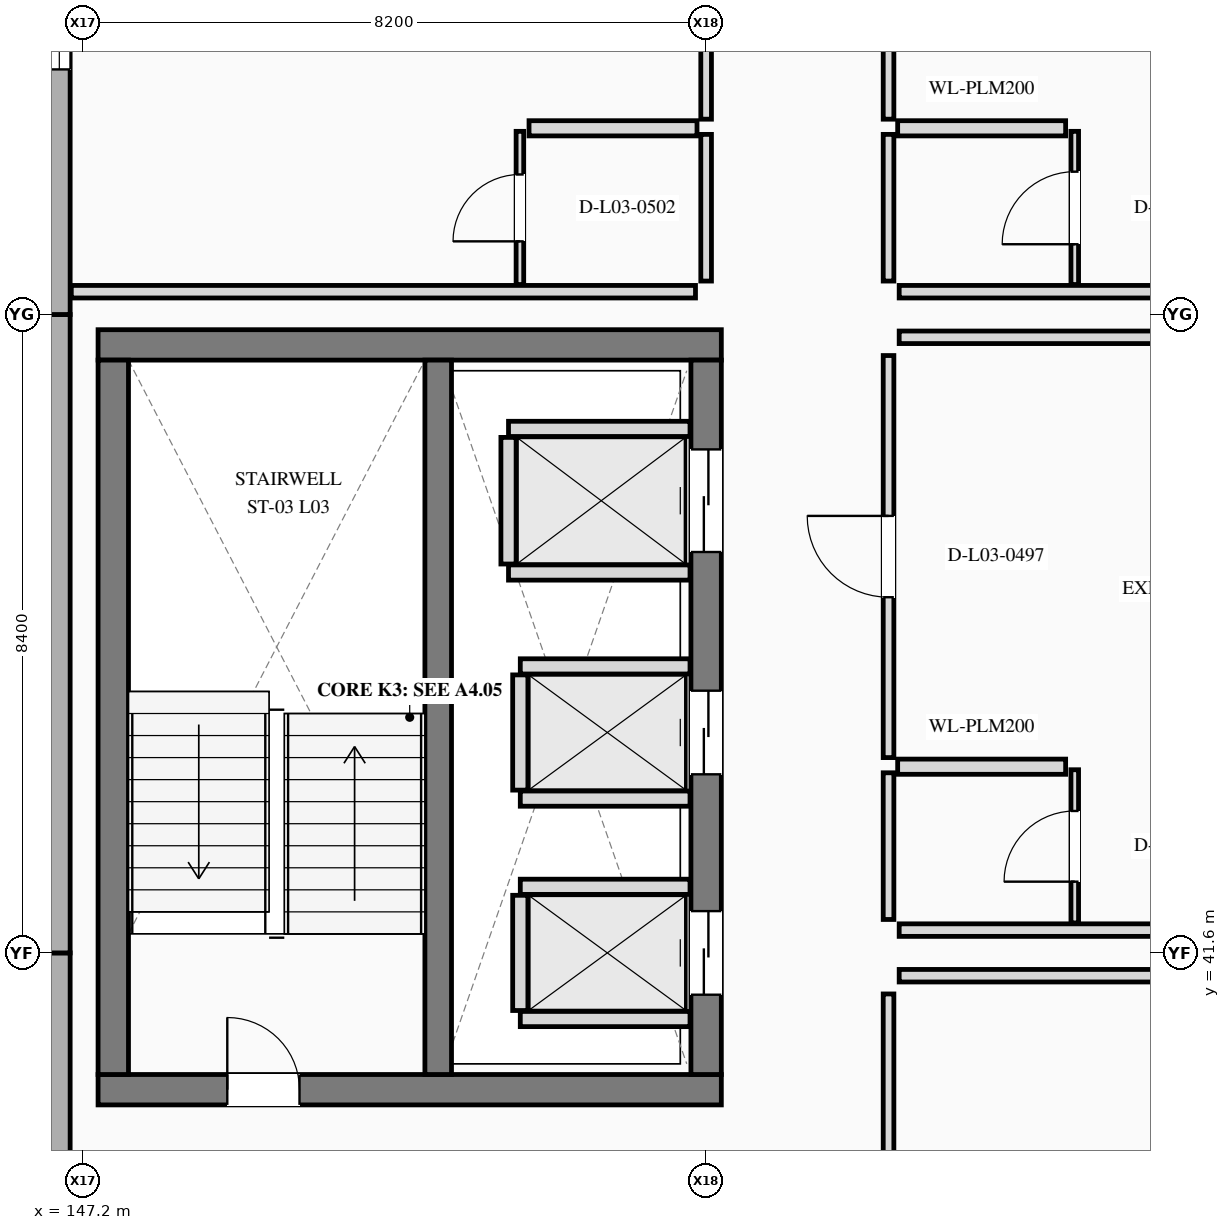
"""IFC4 building model, lengths in metres.
Left out: names, types, materials, properties, quantities, classifications, styles, units other than length and angle.
Written with IfcOpenShell. Run it as: python <this file> out.ifc"""

import sys

from ifc_helpers import new_model, si_unit, direction, frame, frame_2d, origin, place, context, subcontext, project, spatial, rectangle, extrude, element, fill, save


model = new_model("IFC4")
c1 = context("Model", 3, precision=1e-05, world=origin(), true_north=direction((0.0, 1.0)))
c2 = subcontext(c1, "Body", "Model", "MODEL_VIEW")
j1 = project(units=[si_unit("LENGTHUNIT", "METRE"), si_unit("PLANEANGLEUNIT", "RADIAN")], contexts=[c1])
p1 = place(None, origin())
s1 = spatial("IfcSite", under=j1, at=p1, CompositionType="ELEMENT")
p2 = place(p1, origin())
s2 = spatial("IfcBuilding", under=s1, at=p2, CompositionType="ELEMENT")
p3 = place(p2, frame((0.0, 0.0, 15.6)))
s3 = spatial("IfcBuildingStorey", under=s2, at=p3, CompositionType="ELEMENT", Elevation=15.6)
p4 = place(p3, frame((146.89, 33.2, 0.0), z_axis=(0.0, 0.0, 1.0), x_axis=(0.0, 1.0, 0.0)))
e1 = element("IfcWall", 1, at=p4, inside=s3, PredefinedType="STANDARD", context=c2, shape_type="SweptSolid", body=[
    extrude(rectangle(XDim=8.4, YDim=0.285, at=frame_2d((4.2, 0.0))), origin(), (0.0, 0.0, 1.0), 3.9),
])
p5 = place(p3, frame((146.89, 41.6, 0.0), z_axis=(0.0, 0.0, 1.0), x_axis=(0.0, 1.0, 0.0)))
e2 = element("IfcWall", 2, at=p5, inside=s3, PredefinedType="STANDARD", context=c2, shape_type="SweptSolid", body=[
    extrude(rectangle(XDim=8.4, YDim=0.285, at=frame_2d((4.2, 0.0))), origin(), (0.0, 0.0, 1.0), 3.9),
])
p6 = place(p3, frame((146.89, 50.0, 0.0), z_axis=(0.0, 0.0, 1.0), x_axis=(0.0, 1.0, 0.0)))
e3 = element("IfcWall", 3, at=p6, inside=s3, PredefinedType="STANDARD", context=c2, shape_type="SweptSolid", body=[
    extrude(rectangle(XDim=8.4, YDim=0.285, at=frame_2d((4.2, 0.0))), origin(), (0.0, 0.0, 1.0), 3.9),
])
p7 = place(p6, frame((3.225, 0.0, 0.85)))
e4 = element("IfcOpeningElement", 4, at=p7, cuts=e3, PredefinedType="OPENING", context=c2, shape_type="SweptSolid", body=[
    extrude(rectangle(XDim=1.95, YDim=1.85, at=frame_2d((0.975, 0.925))), frame((0.0, 0.152, 0.0), z_axis=(0.0, -1.0, 0.0), x_axis=(1.0, 0.0, 0.0)), (0.0, 0.0, 1.0), 0.305),
])
p8 = place(p3, frame((147.4, 39.8, 0.0), z_axis=(0.0, 0.0, 1.0), x_axis=(1.0, 0.0, 0.0)))
e5 = element("IfcWall", 5, at=p8, inside=s3, PredefinedType="SHEAR", context=c2, shape_type="SweptSolid", body=[
    extrude(rectangle(XDim=8.2, YDim=0.4, at=frame_2d((4.1, 0.0))), origin(), (0.0, 0.0, 1.0), 3.9),
])
p9 = place(p8, frame((1.7, 0.0, 0.0)))
e6 = element("IfcOpeningElement", 6, at=p9, cuts=e5, PredefinedType="OPENING", context=c2, shape_type="SweptSolid", body=[
    extrude(rectangle(XDim=0.95, YDim=2.2, at=frame_2d((0.475, 1.1))), frame((0.0, 0.21, 0.0), z_axis=(0.0, -1.0, 0.0), x_axis=(1.0, 0.0, 0.0)), (0.0, 0.0, 1.0), 0.42),
])
p10 = place(p3, frame((155.6, 49.6, 0.0), z_axis=(0.0, 0.0, 1.0), x_axis=(-1.0, 0.0, 0.0)))
e7 = element("IfcWall", 7, at=p10, inside=s3, PredefinedType="SHEAR", context=c2, shape_type="SweptSolid", body=[
    extrude(rectangle(XDim=8.2, YDim=0.4, at=frame_2d((4.1, 0.0))), origin(), (0.0, 0.0, 1.0), 3.9),
])
p11 = place(p3, frame((147.6, 49.4, 0.0), z_axis=(0.0, 0.0, 1.0), x_axis=(0.0, -1.0, 0.0)))
e8 = element("IfcWall", 8, at=p11, inside=s3, PredefinedType="SHEAR", context=c2, shape_type="SweptSolid", body=[
    extrude(rectangle(XDim=9.4, YDim=0.4, at=frame_2d((4.7, 0.0))), origin(), (0.0, 0.0, 1.0), 3.9),
])
p12 = place(p3, frame((155.4, 40.0, 0.0), z_axis=(0.0, 0.0, 1.0), x_axis=(0.0, 1.0, 0.0)))
e9 = element("IfcWall", 9, at=p12, inside=s3, PredefinedType="SHEAR", context=c2, shape_type="SweptSolid", body=[
    extrude(rectangle(XDim=9.4, YDim=0.4, at=frame_2d((4.7, 0.0))), origin(), (0.0, 0.0, 1.0), 3.9),
])
p13 = place(p12, frame((1.05, 0.0, 0.0)))
e10 = element("IfcOpeningElement", 10, at=p13, cuts=e9, PredefinedType="OPENING", context=c2, shape_type="SweptSolid", body=[
    extrude(rectangle(XDim=1.1, YDim=2.2, at=frame_2d((0.55, 1.1))), frame((0.0, 0.21, 0.0), z_axis=(0.0, -1.0, 0.0), x_axis=(1.0, 0.0, 0.0)), (0.0, 0.0, 1.0), 0.42),
])
p14 = place(p12, frame((3.95, 0.0, 0.0)))
e11 = element("IfcOpeningElement", 11, at=p14, cuts=e9, PredefinedType="OPENING", context=c2, shape_type="SweptSolid", body=[
    extrude(rectangle(XDim=1.1, YDim=2.2, at=frame_2d((0.55, 1.1))), frame((0.0, 0.21, 0.0), z_axis=(0.0, -1.0, 0.0), x_axis=(1.0, 0.0, 0.0)), (0.0, 0.0, 1.0), 0.42),
])
p15 = place(p12, frame((6.875, 0.0, 0.0)))
e12 = element("IfcOpeningElement", 12, at=p15, cuts=e9, PredefinedType="OPENING", context=c2, shape_type="SweptSolid", body=[
    extrude(rectangle(XDim=1.35, YDim=2.3, at=frame_2d((0.675, 1.15))), frame((0.0, 0.21, 0.0), z_axis=(0.0, -1.0, 0.0), x_axis=(1.0, 0.0, 0.0)), (0.0, 0.0, 1.0), 0.42),
])
p16 = place(p3, frame((151.875, 40.0, 0.0), z_axis=(0.0, 0.0, 1.0), x_axis=(0.0, 1.0, 0.0)))
e13 = element("IfcWall", 13, at=p16, inside=s3, PredefinedType="SHEAR", context=c2, shape_type="SweptSolid", body=[
    extrude(rectangle(XDim=9.4, YDim=0.35, at=frame_2d((4.7, 0.0))), origin(), (0.0, 0.0, 1.0), 3.9),
])
for number, where, z_axis, x_axis in (
    (14, (152.955, 40.73, 0.0), (0.0, 0.0, 1.0), (1.0, 0.0, 0.0)),
    (15, (152.955, 42.47, 0.0), (0.0, 0.0, 1.0), (1.0, 0.0, 0.0)),
):
    element("IfcWall", number, at=place(p3, frame(where, z_axis=z_axis, x_axis=x_axis)), inside=s3, PredefinedType="PLUMBINGWALL", context=c2, shape_type="SweptSolid", body=[
        extrude(rectangle(XDim=2.233, YDim=0.2, at=frame_2d((1.116, 0.0))), origin(), (0.0, 0.0, 1.0), 3.6),
    ])
p17 = place(p3, frame((152.955, 40.842, 0.0), z_axis=(0.0, 0.0, 1.0), x_axis=(0.0, 1.0, 0.0)))
e16 = element("IfcWall", 16, at=p17, inside=s3, PredefinedType="PLUMBINGWALL", context=c2, shape_type="SweptSolid", body=[
    extrude(rectangle(XDim=1.516, YDim=0.2, at=frame_2d((0.758, 0.0))), origin(), (0.0, 0.0, 1.0), 3.6),
])
for number, where, z_axis, x_axis in (
    (17, (152.955, 43.63, 0.0), (0.0, 0.0, 1.0), (1.0, 0.0, 0.0)),
    (18, (152.955, 45.37, 0.0), (0.0, 0.0, 1.0), (1.0, 0.0, 0.0)),
):
    element("IfcWall", number, at=place(p3, frame(where, z_axis=z_axis, x_axis=x_axis)), inside=s3, PredefinedType="PLUMBINGWALL", context=c2, shape_type="SweptSolid", body=[
        extrude(rectangle(XDim=2.233, YDim=0.2, at=frame_2d((1.116, 0.0))), origin(), (0.0, 0.0, 1.0), 3.6),
    ])
p18 = place(p3, frame((152.955, 43.742, 0.0), z_axis=(0.0, 0.0, 1.0), x_axis=(0.0, 1.0, 0.0)))
e19 = element("IfcWall", 19, at=p18, inside=s3, PredefinedType="PLUMBINGWALL", context=c2, shape_type="SweptSolid", body=[
    extrude(rectangle(XDim=1.516, YDim=0.2, at=frame_2d((0.758, 0.0))), origin(), (0.0, 0.0, 1.0), 3.6),
])
for number, where, z_axis, x_axis in (
    (20, (152.8, 46.605, 0.0), (0.0, 0.0, 1.0), (1.0, 0.0, 0.0)),
    (21, (152.8, 48.495, 0.0), (0.0, 0.0, 1.0), (1.0, 0.0, 0.0)),
):
    element("IfcWall", number, at=place(p3, frame(where, z_axis=z_axis, x_axis=x_axis)), inside=s3, PredefinedType="PLUMBINGWALL", context=c2, shape_type="SweptSolid", body=[
        extrude(rectangle(XDim=2.388, YDim=0.2, at=frame_2d((1.194, 0.0))), origin(), (0.0, 0.0, 1.0), 3.6),
    ])
p19 = place(p3, frame((152.8, 46.717, 0.0), z_axis=(0.0, 0.0, 1.0), x_axis=(0.0, 1.0, 0.0)))
e22 = element("IfcWall", 22, at=p19, inside=s3, PredefinedType="PLUMBINGWALL", context=c2, shape_type="SweptSolid", body=[
    extrude(rectangle(XDim=1.666, YDim=0.2, at=frame_2d((0.833, 0.0))), origin(), (0.0, 0.0, 1.0), 3.6),
])
p20 = place(p3, frame((157.8, 35.77, 0.0), z_axis=(0.0, 0.0, 1.0), x_axis=(0.0, 1.0, 0.0)))
e23 = element("IfcWall", 23, at=p20, inside=s3, PredefinedType="PARTITIONING", context=c2, shape_type="SweptSolid", body=[
    extrude(rectangle(XDim=5.29, YDim=0.14, at=frame_2d((2.645, 0.0))), origin(), (0.0, 0.0, 1.0), 3.153),
])
p21 = place(p20, frame((2.14, 0.0, 0.0)))
e24 = element("IfcOpeningElement", 24, at=p21, cuts=e23, PredefinedType="OPENING", context=c2, shape_type="SweptSolid", body=[
    extrude(rectangle(XDim=1.01, YDim=2.2, at=frame_2d((0.505, 1.1))), frame((0.0, 0.08, 0.0), z_axis=(0.0, -1.0, 0.0), x_axis=(1.0, 0.0, 0.0)), (0.0, 0.0, 1.0), 0.16),
])
p22 = place(p3, frame((157.94, 41.3, 0.0), z_axis=(0.0, 0.0, 1.0), x_axis=(1.0, 0.0, 0.0)))
e25 = element("IfcWall", 25, at=p22, inside=s3, PredefinedType="PARTITIONING", context=c2, shape_type="SweptSolid", body=[
    extrude(rectangle(XDim=8.213, YDim=0.165, at=frame_2d((4.106, 0.0))), origin(), (0.0, 0.0, 1.0), 2.99),
])
p23 = place(p3, frame((157.8, 42.04, 0.0), z_axis=(0.0, 0.0, 1.0), x_axis=(0.0, 1.0, 0.0)))
e26 = element("IfcWall", 26, at=p23, inside=s3, PredefinedType="PARTITIONING", context=c2, shape_type="SweptSolid", body=[
    extrude(rectangle(XDim=1.93, YDim=0.14, at=frame_2d((0.965, 0.0))), origin(), (0.0, 0.0, 1.0), 3.6),
])
p24 = place(p3, frame((157.8, 44.17, 0.0), z_axis=(0.0, 0.0, 1.0), x_axis=(0.0, 1.0, 0.0)))
e27 = element("IfcWall", 27, at=p24, inside=s3, PredefinedType="PARTITIONING", context=c2, shape_type="SweptSolid", body=[
    extrude(rectangle(XDim=5.29, YDim=0.14, at=frame_2d((2.645, 0.0))), origin(), (0.0, 0.0, 1.0), 3.6),
])
p25 = place(p24, frame((2.11, 0.0, 0.0)))
e28 = element("IfcOpeningElement", 28, at=p25, cuts=e27, PredefinedType="OPENING", context=c2, shape_type="SweptSolid", body=[
    extrude(rectangle(XDim=1.07, YDim=2.25, at=frame_2d((0.535, 1.125))), frame((0.0, 0.08, 0.0), z_axis=(0.0, -1.0, 0.0), x_axis=(1.0, 0.0, 0.0)), (0.0, 0.0, 1.0), 0.16),
])
for number, where, z_axis, x_axis in (
    (29, (157.94, 41.9, 0.0), (0.0, 0.0, 1.0), (1.0, 0.0, 0.0)),
    (30, (157.94, 49.7, 0.0), (0.0, 0.0, 1.0), (1.0, 0.0, 0.0)),
):
    element("IfcWall", number, at=place(p3, frame(where, z_axis=z_axis, x_axis=x_axis)), inside=s3, PredefinedType="PARTITIONING", context=c2, shape_type="SweptSolid", body=[
        extrude(rectangle(XDim=8.213, YDim=0.165, at=frame_2d((4.106, 0.0))), origin(), (0.0, 0.0, 1.0), 2.99),
    ])
p26 = place(p3, frame((157.92, 44.05, 0.0), z_axis=(0.0, 0.0, 1.0), x_axis=(1.0, 0.0, 0.0)))
e31 = element("IfcWall", 31, at=p26, inside=s3, PredefinedType="PLUMBINGWALL", context=c2, shape_type="SweptSolid", body=[
    extrude(rectangle(XDim=2.21, YDim=0.2, at=frame_2d((1.105, 0.0))), origin(), (0.0, 0.0, 1.0), 3.6),
])
p27 = place(p3, frame((160.25, 41.994, 0.0), z_axis=(0.0, 0.0, 1.0), x_axis=(0.0, 1.0, 0.0)))
e32 = element("IfcWall", 32, at=p27, inside=s3, PredefinedType="PARTITIONING", context=c2, shape_type="SweptSolid", body=[
    extrude(rectangle(XDim=2.016, YDim=0.1, at=frame_2d((1.008, 0.0))), origin(), (0.0, 0.0, 1.0), 3.6),
])
p28 = place(p27, frame((0.543, 0.0, 0.0)))
e33 = element("IfcOpeningElement", 33, at=p28, cuts=e32, PredefinedType="OPENING", context=c2, shape_type="SweptSolid", body=[
    extrude(rectangle(XDim=0.93, YDim=2.22, at=frame_2d((0.465, 1.11))), frame((0.0, 0.06, 0.0), z_axis=(0.0, -1.0, 0.0), x_axis=(1.0, 0.0, 0.0)), (0.0, 0.0, 1.0), 0.12),
])
p29 = place(p3, frame((157.8, 50.44, 0.0), z_axis=(0.0, 0.0, 1.0), x_axis=(0.0, 1.0, 0.0)))
e34 = element("IfcWall", 34, at=p29, inside=s3, PredefinedType="PARTITIONING", context=c2, shape_type="SweptSolid", body=[
    extrude(rectangle(XDim=1.93, YDim=0.14, at=frame_2d((0.965, 0.0))), origin(), (0.0, 0.0, 1.0), 3.153),
])
p30 = place(p3, frame((157.8, 52.57, 0.0), z_axis=(0.0, 0.0, 1.0), x_axis=(0.0, 1.0, 0.0)))
e35 = element("IfcWall", 35, at=p30, inside=s3, PredefinedType="PARTITIONING", context=c2, shape_type="SweptSolid", body=[
    extrude(rectangle(XDim=5.29, YDim=0.14, at=frame_2d((2.645, 0.0))), origin(), (0.0, 0.0, 1.0), 3.153),
])
p31 = place(p30, frame((2.185, 0.0, 0.0)))
e36 = element("IfcOpeningElement", 36, at=p31, cuts=e35, PredefinedType="OPENING", context=c2, shape_type="SweptSolid", body=[
    extrude(rectangle(XDim=0.92, YDim=2.3, at=frame_2d((0.46, 1.15))), frame((0.0, 0.08, 0.0), z_axis=(0.0, -1.0, 0.0), x_axis=(1.0, 0.0, 0.0)), (0.0, 0.0, 1.0), 0.16),
])
p32 = place(p3, frame((157.94, 50.3, 0.0), z_axis=(0.0, 0.0, 1.0), x_axis=(1.0, 0.0, 0.0)))
e37 = element("IfcWall", 37, at=p32, inside=s3, PredefinedType="PARTITIONING", context=c2, shape_type="SweptSolid", body=[
    extrude(rectangle(XDim=8.213, YDim=0.165, at=frame_2d((4.106, 0.0))), origin(), (0.0, 0.0, 1.0), 2.99),
])
p33 = place(p3, frame((157.92, 52.45, 0.0), z_axis=(0.0, 0.0, 1.0), x_axis=(1.0, 0.0, 0.0)))
e38 = element("IfcWall", 38, at=p33, inside=s3, PredefinedType="PLUMBINGWALL", context=c2, shape_type="SweptSolid", body=[
    extrude(rectangle(XDim=2.21, YDim=0.2, at=frame_2d((1.105, 0.0))), origin(), (0.0, 0.0, 1.0), 3.6),
])
p34 = place(p3, frame((160.25, 50.395, 0.0), z_axis=(0.0, 0.0, 1.0), x_axis=(0.0, 1.0, 0.0)))
e39 = element("IfcWall", 39, at=p34, inside=s3, PredefinedType="PARTITIONING", context=c2, shape_type="SweptSolid", body=[
    extrude(rectangle(XDim=2.015, YDim=0.1, at=frame_2d((1.008, 0.0))), origin(), (0.0, 0.0, 1.0), 3.153),
])
p35 = place(p34, frame((0.53, 0.0, 0.0)))
e40 = element("IfcOpeningElement", 40, at=p35, cuts=e39, PredefinedType="OPENING", context=c2, shape_type="SweptSolid", body=[
    extrude(rectangle(XDim=0.955, YDim=2.22, at=frame_2d((0.478, 1.11))), frame((0.0, 0.06, 0.0), z_axis=(0.0, -1.0, 0.0), x_axis=(1.0, 0.0, 0.0)), (0.0, 0.0, 1.0), 0.12),
])
p36 = place(p3, frame((155.4, 50.44, 0.0), z_axis=(0.0, 0.0, 1.0), x_axis=(0.0, 1.0, 0.0)))
e41 = element("IfcWall", 41, at=p36, inside=s3, PredefinedType="PARTITIONING", context=c2, shape_type="SweptSolid", body=[
    extrude(rectangle(XDim=1.93, YDim=0.14, at=frame_2d((0.965, 0.0))), origin(), (0.0, 0.0, 1.0), 2.99),
])
p37 = place(p3, frame((155.4, 52.57, 0.0), z_axis=(0.0, 0.0, 1.0), x_axis=(0.0, 1.0, 0.0)))
e42 = element("IfcWall", 42, at=p37, inside=s3, PredefinedType="PARTITIONING", context=c2, shape_type="SweptSolid", body=[
    extrude(rectangle(XDim=5.29, YDim=0.14, at=frame_2d((2.645, 0.0))), origin(), (0.0, 0.0, 1.0), 2.99),
])
p38 = place(p37, frame((2.17, 0.0, 0.0)))
e43 = element("IfcOpeningElement", 43, at=p38, cuts=e42, PredefinedType="OPENING", context=c2, shape_type="SweptSolid", body=[
    extrude(rectangle(XDim=0.95, YDim=2.3, at=frame_2d((0.475, 1.15))), frame((0.0, 0.08, 0.0), z_axis=(0.0, -1.0, 0.0), x_axis=(1.0, 0.0, 0.0)), (0.0, 0.0, 1.0), 0.16),
])
p39 = place(p3, frame((147.048, 50.3, 0.0), z_axis=(0.0, 0.0, 1.0), x_axis=(1.0, 0.0, 0.0)))
e44 = element("IfcWall", 44, at=p39, inside=s3, PredefinedType="PARTITIONING", context=c2, shape_type="SweptSolid", body=[
    extrude(rectangle(XDim=8.212, YDim=0.165, at=frame_2d((4.106, 0.0))), origin(), (0.0, 0.0, 1.0), 3.6),
])
p40 = place(p3, frame((153.07, 52.45, 0.0), z_axis=(0.0, 0.0, 1.0), x_axis=(1.0, 0.0, 0.0)))
e45 = element("IfcWall", 45, at=p40, inside=s3, PredefinedType="PLUMBINGWALL", context=c2, shape_type="SweptSolid", body=[
    extrude(rectangle(XDim=2.21, YDim=0.2, at=frame_2d((1.105, 0.0))), origin(), (0.0, 0.0, 1.0), 3.6),
])
p41 = place(p3, frame((152.95, 50.395, 0.0), z_axis=(0.0, 0.0, 1.0), x_axis=(0.0, 1.0, 0.0)))
e46 = element("IfcWall", 46, at=p41, inside=s3, PredefinedType="PARTITIONING", context=c2, shape_type="SweptSolid", body=[
    extrude(rectangle(XDim=2.015, YDim=0.1, at=frame_2d((1.008, 0.0))), origin(), (0.0, 0.0, 1.0), 3.6),
])
p42 = place(p41, frame((0.568, 0.0, 0.0)))
e47 = element("IfcOpeningElement", 47, at=p42, cuts=e46, PredefinedType="OPENING", context=c2, shape_type="SweptSolid", body=[
    extrude(rectangle(XDim=0.88, YDim=2.1, at=frame_2d((0.44, 1.05))), frame((0.0, 0.06, 0.0), z_axis=(0.0, -1.0, 0.0), x_axis=(1.0, 0.0, 0.0)), (0.0, 0.0, 1.0), 0.12),
])
p43 = place(p7, origin())
e48 = element("IfcWindow", 48, at=p43, inside=s3, PartitioningType="SINGLE_PANEL", PredefinedType="WINDOW", context=c2, shape_type="SweptSolid", body=[
    extrude(rectangle(XDim=1.95, YDim=1.85, at=frame_2d((0.975, 0.925))), frame((0.0, 0.03, 0.0), z_axis=(0.0, -1.0, 0.0), x_axis=(1.0, 0.0, 0.0)), (0.0, 0.0, 1.0), 0.06),
])
fill(e4, e48)
p44 = place(p9, origin())
e49 = element("IfcDoor", 49, at=p44, inside=s3, OperationType="SINGLE_SWING_LEFT", PredefinedType="DOOR", context=c2, shape_type="SweptSolid", body=[
    extrude(rectangle(XDim=0.95, YDim=2.2, at=frame_2d((0.475, 1.1))), frame((0.0, 0.025, 0.0), z_axis=(0.0, -1.0, 0.0), x_axis=(1.0, 0.0, 0.0)), (0.0, 0.0, 1.0), 0.05),
])
fill(e6, e49)
p45 = place(p13, origin())
e50 = element("IfcDoor", 50, at=p45, inside=s3, OperationType="SLIDING_TO_LEFT", PredefinedType="DOOR", context=c2, shape_type="SweptSolid", body=[
    extrude(rectangle(XDim=1.1, YDim=2.2, at=frame_2d((0.55, 1.1))), frame((0.0, 0.025, 0.0), z_axis=(0.0, -1.0, 0.0), x_axis=(1.0, 0.0, 0.0)), (0.0, 0.0, 1.0), 0.05),
])
fill(e10, e50)
p46 = place(p14, origin())
e51 = element("IfcDoor", 51, at=p46, inside=s3, OperationType="SLIDING_TO_RIGHT", PredefinedType="DOOR", context=c2, shape_type="SweptSolid", body=[
    extrude(rectangle(XDim=1.1, YDim=2.2, at=frame_2d((0.55, 1.1))), frame((0.0, 0.025, 0.0), z_axis=(0.0, -1.0, 0.0), x_axis=(1.0, 0.0, 0.0)), (0.0, 0.0, 1.0), 0.05),
])
fill(e11, e51)
p47 = place(p15, origin())
e52 = element("IfcDoor", 52, at=p47, inside=s3, OperationType="SLIDING_TO_LEFT", PredefinedType="DOOR", context=c2, shape_type="SweptSolid", body=[
    extrude(rectangle(XDim=1.35, YDim=2.3, at=frame_2d((0.675, 1.15))), frame((0.0, 0.025, 0.0), z_axis=(0.0, -1.0, 0.0), x_axis=(1.0, 0.0, 0.0)), (0.0, 0.0, 1.0), 0.05),
])
fill(e12, e52)
p48 = place(p25, origin())
e53 = element("IfcDoor", 53, at=p48, inside=s3, OperationType="SINGLE_SWING_RIGHT", PredefinedType="DOOR", context=c2, shape_type="SweptSolid", body=[
    extrude(rectangle(XDim=1.07, YDim=2.25, at=frame_2d((0.535, 1.125))), frame((0.0, 0.025, 0.0), z_axis=(0.0, -1.0, 0.0), x_axis=(1.0, 0.0, 0.0)), (0.0, 0.0, 1.0), 0.05),
])
fill(e28, e53)
p49 = place(p28, origin())
e54 = element("IfcDoor", 54, at=p49, inside=s3, OperationType="SINGLE_SWING_LEFT", PredefinedType="DOOR", context=c2, shape_type="SweptSolid", body=[
    extrude(rectangle(XDim=0.93, YDim=2.22, at=frame_2d((0.465, 1.11))), frame((0.0, 0.025, 0.0), z_axis=(0.0, -1.0, 0.0), x_axis=(1.0, 0.0, 0.0)), (0.0, 0.0, 1.0), 0.05),
])
fill(e33, e54)
p50 = place(p35, origin())
e55 = element("IfcDoor", 55, at=p50, inside=s3, OperationType="SINGLE_SWING_LEFT", PredefinedType="DOOR", context=c2, shape_type="SweptSolid", body=[
    extrude(rectangle(XDim=0.955, YDim=2.22, at=frame_2d((0.478, 1.11))), frame((0.0, 0.025, 0.0), z_axis=(0.0, -1.0, 0.0), x_axis=(1.0, 0.0, 0.0)), (0.0, 0.0, 1.0), 0.05),
])
fill(e40, e55)
p51 = place(p42, origin())
e56 = element("IfcDoor", 56, at=p51, inside=s3, OperationType="SINGLE_SWING_LEFT", PredefinedType="DOOR", context=c2, shape_type="SweptSolid", body=[
    extrude(rectangle(XDim=0.88, YDim=2.1, at=frame_2d((0.44, 1.05))), frame((0.0, 0.025, 0.0), z_axis=(0.0, -1.0, 0.0), x_axis=(1.0, 0.0, 0.0)), (0.0, 0.0, 1.0), 0.05),
])
fill(e47, e56)
save(model, sys.argv[1])
